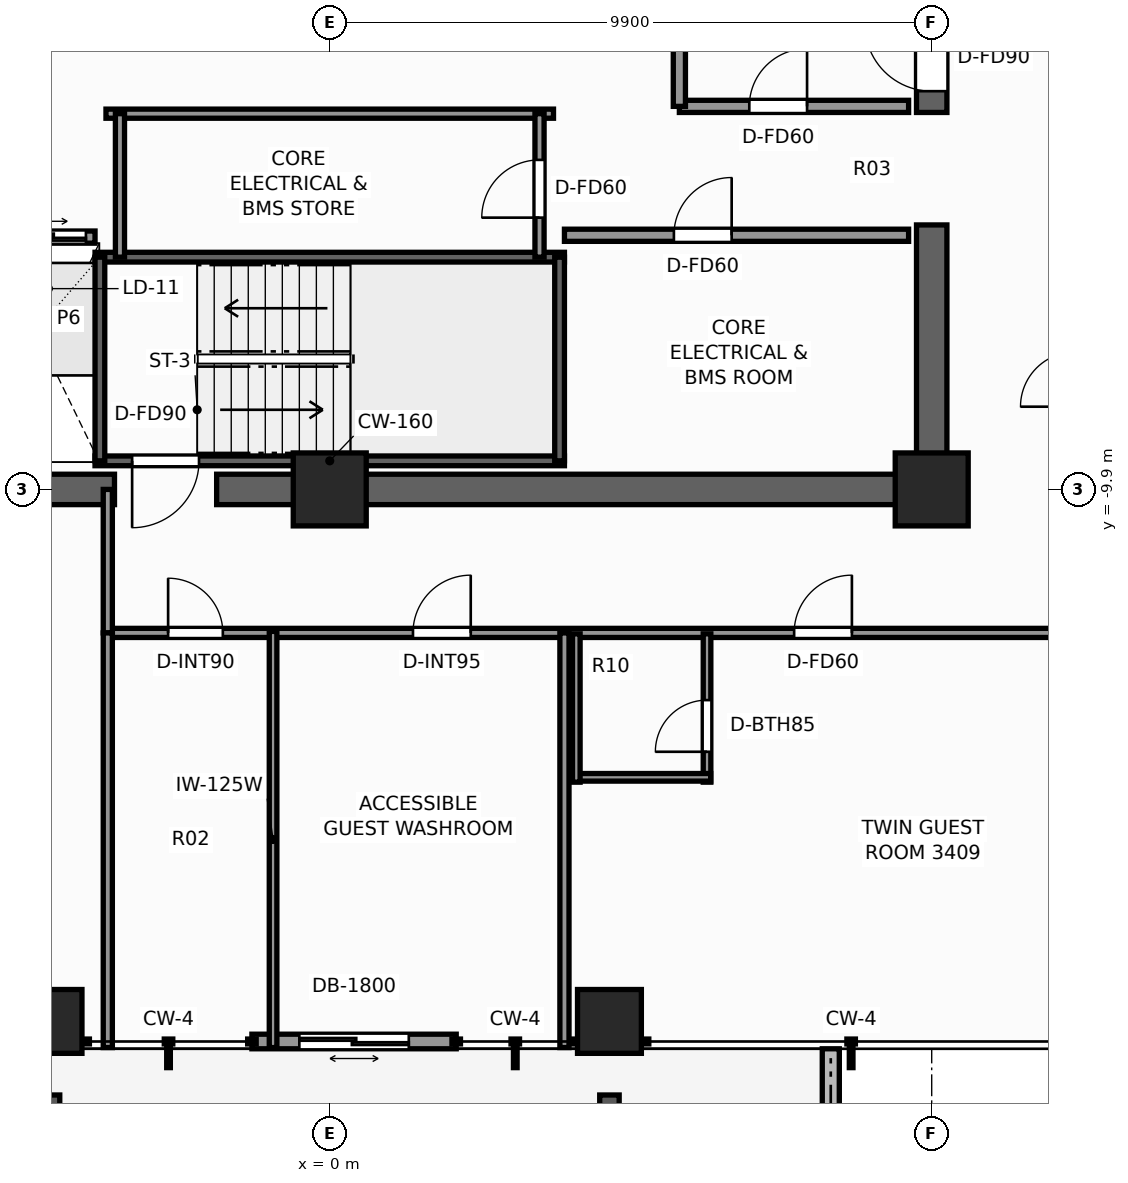
"""IFC4 building model, lengths in metres.
Left out: names, types, materials, properties, quantities, classifications, styles, units other than length and angle.
Written with IfcOpenShell. Run it as: python <this file> out.ifc"""

import sys

from ifc_helpers import new_model, si_unit, direction, frame, frame_2d, origin, origin_2d, place, context, subcontext, project, spatial, rectangle, extrude, element, fill, save


model = new_model("IFC4")
c1 = context("Model", 3, precision=1e-05, world=origin(), true_north=direction((0.0, 1.0)))
c2 = subcontext(c1, "Body", "Model", "MODEL_VIEW")
j1 = project(units=[si_unit("LENGTHUNIT", "METRE"), si_unit("PLANEANGLEUNIT", "RADIAN")], contexts=[c1])
p1 = place(None, origin())
s1 = spatial("IfcSite", under=j1, at=p1, CompositionType="ELEMENT")
p2 = place(p1, origin())
s2 = spatial("IfcBuilding", under=s1, at=p2, CompositionType="ELEMENT")
p3 = place(p2, frame((0.0, 0.0, 118.4)))
s3 = spatial("IfcBuildingStorey", under=s2, at=p3, CompositionType="ELEMENT", Elevation=118.4)
p4 = place(p3, frame((10.15, -9.9, 0.0), z_axis=(0.0, 0.0, 1.0), x_axis=(-1.0, 0.0, 0.0)))
e1 = element("IfcWall", 1, at=p4, inside=s3, PredefinedType="SHEAR", context=c2, shape_type="SweptSolid", body=[
    extrude(rectangle(XDim=12.01, YDim=0.5, at=frame_2d((6.005, 0.0))), origin(), (0.0, 0.0, 1.0), 3.3),
])
p5 = place(p3, frame((-3.54, -9.9, 0.0), z_axis=(0.0, 0.0, 1.0), x_axis=(-1.0, 0.0, 0.0)))
e2 = element("IfcWall", 2, at=p5, inside=s3, PredefinedType="SHEAR", context=c2, shape_type="SweptSolid", body=[
    extrude(rectangle(XDim=6.61, YDim=0.5, at=frame_2d((3.305, 0.0))), origin(), (0.0, 0.0, 1.0), 3.3),
])
p6 = place(p3, frame((9.9, -9.65, 0.0), z_axis=(0.0, 0.0, 1.0), x_axis=(0.0, 1.0, 0.0)))
e3 = element("IfcWall", 3, at=p6, inside=s3, PredefinedType="SHEAR", context=c2, shape_type="SweptSolid", body=[
    extrude(rectangle(XDim=4.1, YDim=0.5, at=frame_2d((2.05, 0.0))), origin(), (0.0, 0.0, 1.0), 3.3),
])
p7 = place(p3, frame((9.9, -3.7, 0.0), z_axis=(0.0, 0.0, 1.0), x_axis=(0.0, 1.0, 0.0)))
e4 = element("IfcWall", 4, at=p7, inside=s3, PredefinedType="SHEAR", context=c2, shape_type="SweptSolid", body=[
    extrude(rectangle(XDim=13.35, YDim=0.5, at=frame_2d((6.675, 0.0))), origin(), (0.0, 0.0, 1.0), 3.3),
])
p8 = place(p7, frame((0.35, 0.0, 0.0)))
e5 = element("IfcOpeningElement", 5, at=p8, cuts=e4, PredefinedType="OPENING", context=c2, shape_type="SweptSolid", body=[
    extrude(rectangle(XDim=1.1, YDim=2.2, at=frame_2d((0.55, 1.1))), frame((0.0, 0.26, 0.0), z_axis=(0.0, -1.0, 0.0), x_axis=(1.0, 0.0, 0.0)), (0.0, 0.0, 1.0), 0.52),
])
for number, where, z_axis, x_axis in (
    (6, (9.9, -9.9, 0.0), (0.0, 0.0, 1.0), (1.0, 0.0, 0.0)),
    (7, (0.0, -9.9, 0.0), (0.0, 0.0, 1.0), (1.0, 0.0, 0.0)),
):
    element("IfcColumn", number, at=place(p3, frame(where, z_axis=z_axis, x_axis=x_axis)), inside=s3, PredefinedType="COLUMN", context=c2, shape_type="SweptSolid", body=[
        extrude(rectangle(XDim=1.2, YDim=1.2, at=origin_2d()), origin(), (0.0, 0.0, 1.0), 3.3),
    ])
for number, where, z_axis, x_axis in (
    (8, (-4.6, -18.65, 0.0), (0.0, 0.0, 1.0), (1.0, 0.0, 0.0)),
    (9, (4.6, -18.65, 0.0), (0.0, 0.0, 1.0), (1.0, 0.0, 0.0)),
):
    element("IfcColumn", number, at=place(p3, frame(where, z_axis=z_axis, x_axis=x_axis)), inside=s3, PredefinedType="COLUMN", context=c2, shape_type="SweptSolid", body=[
        extrude(rectangle(XDim=1.05, YDim=1.05, at=origin_2d()), origin(), (0.0, 0.0, 1.0), 3.3),
    ])
p9 = place(p3, frame((8.24, -20.566, -0.04), z_axis=(0.0, 0.0, 1.0), x_axis=(0.0, 1.0, 0.0)))
e10 = element("IfcWall", 10, at=p9, inside=s3, PredefinedType="PARAPET", context=c2, shape_type="SweptSolid", body=[
    extrude(rectangle(XDim=1.466, YDim=0.28, at=frame_2d((0.733, 0.0))), origin(), (0.0, 0.0, 1.0), 0.42),
])
p10 = place(p3, frame((2.08, -18.98, 0.0), z_axis=(0.0, 0.0, 1.0), x_axis=(-1.0, 0.0, 0.0)))
e11 = element("IfcWall", 11, at=p10, inside=s3, PredefinedType="STANDARD", context=c2, shape_type="SweptSolid", body=[
    extrude(rectangle(XDim=3.36, YDim=0.24, at=frame_2d((1.68, 0.0))), origin(), (0.0, 0.0, 1.0), 3.08),
])
p11 = place(p10, frame((0.78, 0.0, 0.0)))
e12 = element("IfcOpeningElement", 12, at=p11, cuts=e11, PredefinedType="OPENING", context=c2, shape_type="SweptSolid", body=[
    extrude(rectangle(XDim=1.8, YDim=2.2, at=frame_2d((0.9, 1.1))), frame((0.0, 0.13, 0.0), z_axis=(0.0, -1.0, 0.0), x_axis=(1.0, 0.0, 0.0)), (0.0, 0.0, 1.0), 0.26),
])
p12 = place(p3, frame((3.86, -9.43, 0.0), z_axis=(0.0, 0.0, 1.0), x_axis=(-1.0, 0.0, 0.0)))
e13 = element("IfcWall", 13, at=p12, inside=s3, PredefinedType="SHEAR", context=c2, shape_type="SweptSolid", body=[
    extrude(rectangle(XDim=7.72, YDim=0.16, at=frame_2d((3.86, 0.0))), origin(), (0.0, 0.0, 1.0), 3.3),
])
p13 = place(p12, frame((6.01, 0.0, 0.0)))
e14 = element("IfcOpeningElement", 14, at=p13, cuts=e13, PredefinedType="OPENING", context=c2, shape_type="SweptSolid", body=[
    extrude(rectangle(XDim=1.1, YDim=2.2, at=frame_2d((0.55, 1.1))), frame((0.0, 0.09, 0.0), z_axis=(0.0, -1.0, 0.0), x_axis=(1.0, 0.0, 0.0)), (0.0, 0.0, 1.0), 0.18),
])
p14 = place(p3, frame((-3.86, -6.08, 0.0), z_axis=(0.0, 0.0, 1.0), x_axis=(1.0, 0.0, 0.0)))
e15 = element("IfcWall", 15, at=p14, inside=s3, PredefinedType="SHEAR", context=c2, shape_type="SweptSolid", body=[
    extrude(rectangle(XDim=7.72, YDim=0.16, at=frame_2d((3.86, 0.0))), origin(), (0.0, 0.0, 1.0), 3.3),
])
for number, where, z_axis, x_axis in (
    (16, (-3.78, -9.43, 0.0), (0.0, 0.0, 1.0), (0.0, 1.0, 0.0)),
    (17, (3.78, -9.43, 0.0), (0.0, 0.0, 1.0), (0.0, 1.0, 0.0)),
):
    element("IfcWall", number, at=place(p3, frame(where, z_axis=z_axis, x_axis=x_axis)), inside=s3, PredefinedType="SHEAR", context=c2, shape_type="SweptSolid", body=[
        extrude(rectangle(XDim=3.35, YDim=0.16, at=frame_2d((1.675, 0.0))), origin(), (0.0, 0.0, 1.0), 3.3),
    ])
p15 = place(p3, frame((5.75, -3.6, 0.0), z_axis=(0.0, 0.0, 1.0), x_axis=(1.0, 0.0, 0.0)))
e18 = element("IfcWall", 18, at=p15, inside=s3, PredefinedType="SOLIDWALL", context=c2, shape_type="SweptSolid", body=[
    extrude(rectangle(XDim=3.77, YDim=0.2, at=frame_2d((1.885, 0.0))), origin(), (0.0, 0.0, 1.0), 3.08),
])
p16 = place(p15, frame((1.15, 0.0, 0.0)))
e19 = element("IfcOpeningElement", 19, at=p16, cuts=e18, PredefinedType="OPENING", context=c2, shape_type="SweptSolid", body=[
    extrude(rectangle(XDim=0.95, YDim=2.06, at=frame_2d((0.475, 1.03))), frame((0.0, 0.11, 0.0), z_axis=(0.0, -1.0, 0.0), x_axis=(1.0, 0.0, 0.0)), (0.0, 0.0, 1.0), 0.22),
])
p17 = place(p3, frame((5.75, -3.6, 0.0), z_axis=(0.0, 0.0, 1.0), x_axis=(0.0, 1.0, 0.0)))
e20 = element("IfcWall", 20, at=p17, inside=s3, PredefinedType="SOLIDWALL", context=c2, shape_type="SweptSolid", body=[
    extrude(rectangle(XDim=5.57, YDim=0.2, at=frame_2d((2.785, 0.0))), origin(), (0.0, 0.0, 1.0), 2.715),
])
p18 = place(p17, frame((2.75, 0.0, 0.0)))
e21 = element("IfcOpeningElement", 21, at=p18, cuts=e20, PredefinedType="OPENING", context=c2, shape_type="SweptSolid", body=[
    extrude(rectangle(XDim=1.1, YDim=2.2, at=frame_2d((0.55, 1.1))), frame((0.0, 0.11, 0.0), z_axis=(0.0, -1.0, 0.0), x_axis=(1.0, 0.0, 0.0)), (0.0, 0.0, 1.0), 0.22),
])
p19 = place(p3, frame((-9.52, -5.75, 0.0), z_axis=(0.0, 0.0, 1.0), x_axis=(1.0, 0.0, 0.0)))
e22 = element("IfcWall", 22, at=p19, inside=s3, PredefinedType="SOLIDWALL", context=c2, shape_type="SweptSolid", body=[
    extrude(rectangle(XDim=5.66, YDim=0.2, at=frame_2d((2.83, 0.0))), origin(), (0.0, 0.0, 1.0), 3.08),
])
p20 = place(p19, frame((0.55, 0.0, 0.0)))
e23 = element("IfcOpeningElement", 23, at=p20, cuts=e22, PredefinedType="OPENING", context=c2, shape_type="SweptSolid", body=[
    extrude(rectangle(XDim=1.1, YDim=2.2, at=frame_2d((0.55, 1.1))), frame((0.0, 0.11, 0.0), z_axis=(0.0, -1.0, 0.0), x_axis=(1.0, 0.0, 0.0)), (0.0, 0.0, 1.0), 0.22),
])
p21 = place(p19, frame((2.48, 0.0, 0.0)))
e24 = element("IfcOpeningElement", 24, at=p21, cuts=e22, PredefinedType="OPENING", context=c2, shape_type="SweptSolid", body=[
    extrude(rectangle(XDim=1.1, YDim=2.2, at=frame_2d((0.55, 1.1))), frame((0.0, 0.11, 0.0), z_axis=(0.0, -1.0, 0.0), x_axis=(1.0, 0.0, 0.0)), (0.0, 0.0, 1.0), 0.22),
])
p22 = place(p19, frame((4.41, 0.0, 0.0)))
e25 = element("IfcOpeningElement", 25, at=p22, cuts=e22, PredefinedType="OPENING", context=c2, shape_type="SweptSolid", body=[
    extrude(rectangle(XDim=1.1, YDim=2.2, at=frame_2d((0.55, 1.1))), frame((0.0, 0.11, 0.0), z_axis=(0.0, -1.0, 0.0), x_axis=(1.0, 0.0, 0.0)), (0.0, 0.0, 1.0), 0.22),
])
p23 = place(p3, frame((3.86, -5.72, 0.0), z_axis=(0.0, 0.0, 1.0), x_axis=(1.0, 0.0, 0.0)))
e26 = element("IfcWall", 26, at=p23, inside=s3, PredefinedType="SOLIDWALL", context=c2, shape_type="SweptSolid", body=[
    extrude(rectangle(XDim=5.66, YDim=0.2, at=frame_2d((2.83, 0.0))), origin(), (0.0, 0.0, 1.0), 3.08),
])
p24 = place(p23, frame((1.8, 0.0, 0.0)))
e27 = element("IfcOpeningElement", 27, at=p24, cuts=e26, PredefinedType="OPENING", context=c2, shape_type="SweptSolid", body=[
    extrude(rectangle(XDim=0.95, YDim=2.06, at=frame_2d((0.475, 1.03))), frame((0.0, 0.11, 0.0), z_axis=(0.0, -1.0, 0.0), x_axis=(1.0, 0.0, 0.0)), (0.0, 0.0, 1.0), 0.22),
])
p25 = place(p3, frame((-3.68, -3.72, 0.0), z_axis=(0.0, 0.0, 1.0), x_axis=(1.0, 0.0, 0.0)))
e28 = element("IfcWall", 28, at=p25, inside=s3, PredefinedType="PARTITIONING", context=c2, shape_type="SweptSolid", body=[
    extrude(rectangle(XDim=7.36, YDim=0.15, at=frame_2d((3.68, 0.0))), origin(), (0.0, 0.0, 1.0), 3.08),
])
p26 = place(p3, frame((3.45, -6.08, 0.0), z_axis=(0.0, 0.0, 1.0), x_axis=(0.0, 1.0, 0.0)))
e29 = element("IfcWall", 29, at=p26, inside=s3, PredefinedType="PARTITIONING", context=c2, shape_type="SweptSolid", body=[
    extrude(rectangle(XDim=2.36, YDim=0.15, at=frame_2d((1.18, 0.0))), origin(), (0.0, 0.0, 1.0), 3.08),
])
p27 = place(p26, frame((0.65, 0.0, 0.0)))
e30 = element("IfcOpeningElement", 30, at=p27, cuts=e29, PredefinedType="OPENING", context=c2, shape_type="SweptSolid", body=[
    extrude(rectangle(XDim=0.95, YDim=2.06, at=frame_2d((0.475, 1.03))), frame((0.0, 0.085, 0.0), z_axis=(0.0, -1.0, 0.0), x_axis=(1.0, 0.0, 0.0)), (0.0, 0.0, 1.0), 0.17),
])
p28 = place(p3, frame((-3.45, -6.08, 0.0), z_axis=(0.0, 0.0, 1.0), x_axis=(0.0, 1.0, 0.0)))
e31 = element("IfcWall", 31, at=p28, inside=s3, PredefinedType="PARTITIONING", context=c2, shape_type="SweptSolid", body=[
    extrude(rectangle(XDim=2.36, YDim=0.15, at=frame_2d((1.18, 0.0))), origin(), (0.0, 0.0, 1.0), 3.08),
])
p29 = place(p3, frame((-3.65, -12.26, 0.0), z_axis=(0.0, 0.0, 1.0), x_axis=(1.0, 0.0, 0.0)))
e32 = element("IfcWall", 32, at=p29, inside=s3, PredefinedType="PARTITIONING", context=c2, shape_type="SweptSolid", body=[
    extrude(rectangle(XDim=15.91, YDim=0.15, at=frame_2d((7.955, 0.0))), origin(), (0.0, 0.0, 1.0), 2.292),
])
p30 = place(p29, frame((0.992, 0.0, 0.0)))
e33 = element("IfcOpeningElement", 33, at=p30, cuts=e32, PredefinedType="OPENING", context=c2, shape_type="SweptSolid", body=[
    extrude(rectangle(XDim=0.9, YDim=2.06, at=frame_2d((0.45, 1.03))), frame((0.0, 0.085, 0.0), z_axis=(0.0, -1.0, 0.0), x_axis=(1.0, 0.0, 0.0)), (0.0, 0.0, 1.0), 0.17),
])
p31 = place(p29, frame((5.019, 0.0, 0.0)))
e34 = element("IfcOpeningElement", 34, at=p31, cuts=e32, PredefinedType="OPENING", context=c2, shape_type="SweptSolid", body=[
    extrude(rectangle(XDim=0.95, YDim=2.06, at=frame_2d((0.475, 1.03))), frame((0.0, 0.085, 0.0), z_axis=(0.0, -1.0, 0.0), x_axis=(1.0, 0.0, 0.0)), (0.0, 0.0, 1.0), 0.17),
])
p32 = place(p29, frame((11.288, 0.0, 0.0)))
e35 = element("IfcOpeningElement", 35, at=p32, cuts=e32, PredefinedType="OPENING", context=c2, shape_type="SweptSolid", body=[
    extrude(rectangle(XDim=0.95, YDim=2.06, at=frame_2d((0.475, 1.03))), frame((0.0, 0.085, 0.0), z_axis=(0.0, -1.0, 0.0), x_axis=(1.0, 0.0, 0.0)), (0.0, 0.0, 1.0), 0.17),
])
p33 = place(p3, frame((-3.65, -12.26, 0.0), z_axis=(0.0, 0.0, 1.0), x_axis=(0.0, 1.0, 0.0)))
e36 = element("IfcWall", 36, at=p33, inside=s3, PredefinedType="PARTITIONING", context=c2, shape_type="SweptSolid", body=[
    extrude(rectangle(XDim=2.36, YDim=0.15, at=frame_2d((1.18, 0.0))), origin(), (0.0, 0.0, 1.0), 3.08),
])
for number, where, z_axis, x_axis in (
    (37, (-3.65, -19.08, 0.0), (0.0, 0.0, 1.0), (0.0, 1.0, 0.0)),
    (38, (3.86, -19.08, 0.0), (0.0, 0.0, 1.0), (0.0, 1.0, 0.0)),
):
    element("IfcWall", number, at=place(p3, frame(where, z_axis=z_axis, x_axis=x_axis)), inside=s3, PredefinedType="PARTITIONING", context=c2, shape_type="SweptSolid", body=[
        extrude(rectangle(XDim=6.82, YDim=0.15, at=frame_2d((3.41, 0.0))), origin(), (0.0, 0.0, 1.0), 2.449),
    ])
p34 = place(p3, frame((-0.932, -19.08, 0.0), z_axis=(0.0, 0.0, 1.0), x_axis=(0.0, 1.0, 0.0)))
e39 = element("IfcWall", 39, at=p34, inside=s3, PredefinedType="PARTITIONING", context=c2, shape_type="SweptSolid", body=[
    extrude(rectangle(XDim=6.845, YDim=0.125, at=frame_2d((3.422, 0.0))), origin(), (0.0, 0.0, 1.0), 2.449),
])
p35 = place(p3, frame((6.205, -14.715, 0.0), z_axis=(0.0, 0.0, 1.0), x_axis=(0.0, 1.0, 0.0)))
e40 = element("IfcWall", 40, at=p35, inside=s3, PredefinedType="PARTITIONING", context=c2, shape_type="SweptSolid", body=[
    extrude(rectangle(XDim=2.44, YDim=0.125, at=frame_2d((1.22, 0.0))), origin(), (0.0, 0.0, 1.0), 3.08),
])
p36 = place(p35, frame((0.5, 0.0, 0.0)))
e41 = element("IfcOpeningElement", 41, at=p36, cuts=e40, PredefinedType="OPENING", context=c2, shape_type="SweptSolid", body=[
    extrude(rectangle(XDim=0.85, YDim=2.03, at=frame_2d((0.425, 1.015))), frame((0.0, 0.073, 0.0), z_axis=(0.0, -1.0, 0.0), x_axis=(1.0, 0.0, 0.0)), (0.0, 0.0, 1.0), 0.145),
])
p37 = place(p3, frame((3.995, -14.635, 0.0), z_axis=(0.0, 0.0, 1.0), x_axis=(1.0, 0.0, 0.0)))
e42 = element("IfcWall", 42, at=p37, inside=s3, PredefinedType="PARTITIONING", context=c2, shape_type="SweptSolid", body=[
    extrude(rectangle(XDim=2.27, YDim=0.125, at=frame_2d((1.135, 0.0))), origin(), (0.0, 0.0, 1.0), 2.292),
])
p38 = place(p3, frame((4.055, -14.715, 0.0), z_axis=(0.0, 0.0, 1.0), x_axis=(0.0, 1.0, 0.0)))
e43 = element("IfcWall", 43, at=p38, inside=s3, PredefinedType="PARTITIONING", context=c2, shape_type="SweptSolid", body=[
    extrude(rectangle(XDim=2.44, YDim=0.125, at=frame_2d((1.22, 0.0))), origin(), (0.0, 0.0, 1.0), 3.08),
])
p39 = place(p11, origin())
e44 = element("IfcDoor", 44, at=p39, inside=s3, OperationType="DOUBLE_DOOR_SLIDING", PredefinedType="DOOR", context=c2, shape_type="SweptSolid", body=[
    extrude(rectangle(XDim=1.8, YDim=2.2, at=frame_2d((0.9, 1.1))), frame((0.0, 0.025, 0.0), z_axis=(0.0, -1.0, 0.0), x_axis=(1.0, 0.0, 0.0)), (0.0, 0.0, 1.0), 0.05),
])
fill(e12, e44)
p40 = place(p13, origin())
e45 = element("IfcDoor", 45, at=p40, inside=s3, OperationType="SINGLE_SWING_RIGHT", PredefinedType="DOOR", context=c2, shape_type="SweptSolid", body=[
    extrude(rectangle(XDim=1.1, YDim=2.2, at=frame_2d((0.55, 1.1))), frame((0.0, 0.025, 0.0), z_axis=(0.0, -1.0, 0.0), x_axis=(1.0, 0.0, 0.0)), (0.0, 0.0, 1.0), 0.05),
])
fill(e14, e45)
p41 = place(p8, origin())
e46 = element("IfcDoor", 46, at=p41, inside=s3, OperationType="SINGLE_SWING_RIGHT", PredefinedType="DOOR", context=c2, shape_type="SweptSolid", body=[
    extrude(rectangle(XDim=1.1, YDim=2.2, at=frame_2d((0.55, 1.1))), frame((0.0, 0.025, 0.0), z_axis=(0.0, -1.0, 0.0), x_axis=(1.0, 0.0, 0.0)), (0.0, 0.0, 1.0), 0.05),
])
fill(e5, e46)
p42 = place(p22, origin())
e47 = element("IfcDoor", 47, at=p42, inside=s3, OperationType="DOUBLE_DOOR_SLIDING", PredefinedType="DOOR", context=c2, shape_type="SweptSolid", body=[
    extrude(rectangle(XDim=1.1, YDim=2.2, at=frame_2d((0.55, 1.1))), frame((0.0, 0.025, 0.0), z_axis=(0.0, -1.0, 0.0), x_axis=(1.0, 0.0, 0.0)), (0.0, 0.0, 1.0), 0.05),
])
fill(e25, e47)
p43 = place(p24, origin())
e48 = element("IfcDoor", 48, at=p43, inside=s3, OperationType="SINGLE_SWING_RIGHT", PredefinedType="DOOR", context=c2, shape_type="SweptSolid", body=[
    extrude(rectangle(XDim=0.95, YDim=2.06, at=frame_2d((0.475, 1.03))), frame((0.0, 0.025, 0.0), z_axis=(0.0, -1.0, 0.0), x_axis=(1.0, 0.0, 0.0)), (0.0, 0.0, 1.0), 0.05),
])
fill(e27, e48)
p44 = place(p16, origin())
e49 = element("IfcDoor", 49, at=p44, inside=s3, OperationType="SINGLE_SWING_RIGHT", PredefinedType="DOOR", context=c2, shape_type="SweptSolid", body=[
    extrude(rectangle(XDim=0.95, YDim=2.06, at=frame_2d((0.475, 1.03))), frame((0.0, 0.025, 0.0), z_axis=(0.0, -1.0, 0.0), x_axis=(1.0, 0.0, 0.0)), (0.0, 0.0, 1.0), 0.05),
])
fill(e19, e49)
p45 = place(p27, origin())
e50 = element("IfcDoor", 50, at=p45, inside=s3, OperationType="SINGLE_SWING_LEFT", PredefinedType="DOOR", context=c2, shape_type="SweptSolid", body=[
    extrude(rectangle(XDim=0.95, YDim=2.06, at=frame_2d((0.475, 1.03))), frame((0.0, 0.025, 0.0), z_axis=(0.0, -1.0, 0.0), x_axis=(1.0, 0.0, 0.0)), (0.0, 0.0, 1.0), 0.05),
])
fill(e30, e50)
p46 = place(p30, origin())
e51 = element("IfcDoor", 51, at=p46, inside=s3, OperationType="SINGLE_SWING_LEFT", PredefinedType="DOOR", context=c2, shape_type="SweptSolid", body=[
    extrude(rectangle(XDim=0.9, YDim=2.06, at=frame_2d((0.45, 1.03))), frame((0.0, 0.025, 0.0), z_axis=(0.0, -1.0, 0.0), x_axis=(1.0, 0.0, 0.0)), (0.0, 0.0, 1.0), 0.05),
])
fill(e33, e51)
p47 = place(p31, origin())
e52 = element("IfcDoor", 52, at=p47, inside=s3, OperationType="SINGLE_SWING_RIGHT", PredefinedType="DOOR", context=c2, shape_type="SweptSolid", body=[
    extrude(rectangle(XDim=0.95, YDim=2.06, at=frame_2d((0.475, 1.03))), frame((0.0, 0.025, 0.0), z_axis=(0.0, -1.0, 0.0), x_axis=(1.0, 0.0, 0.0)), (0.0, 0.0, 1.0), 0.05),
])
fill(e34, e52)
p48 = place(p36, origin())
e53 = element("IfcDoor", 53, at=p48, inside=s3, OperationType="SINGLE_SWING_LEFT", PredefinedType="DOOR", context=c2, shape_type="SweptSolid", body=[
    extrude(rectangle(XDim=0.85, YDim=2.03, at=frame_2d((0.425, 1.015))), frame((0.0, 0.025, 0.0), z_axis=(0.0, -1.0, 0.0), x_axis=(1.0, 0.0, 0.0)), (0.0, 0.0, 1.0), 0.05),
])
fill(e41, e53)
p49 = place(p32, origin())
e54 = element("IfcDoor", 54, at=p49, inside=s3, OperationType="SINGLE_SWING_RIGHT", PredefinedType="DOOR", context=c2, shape_type="SweptSolid", body=[
    extrude(rectangle(XDim=0.95, YDim=2.06, at=frame_2d((0.475, 1.03))), frame((0.0, 0.025, 0.0), z_axis=(0.0, -1.0, 0.0), x_axis=(1.0, 0.0, 0.0)), (0.0, 0.0, 1.0), 0.05),
])
fill(e35, e54)
save(model, sys.argv[1])
